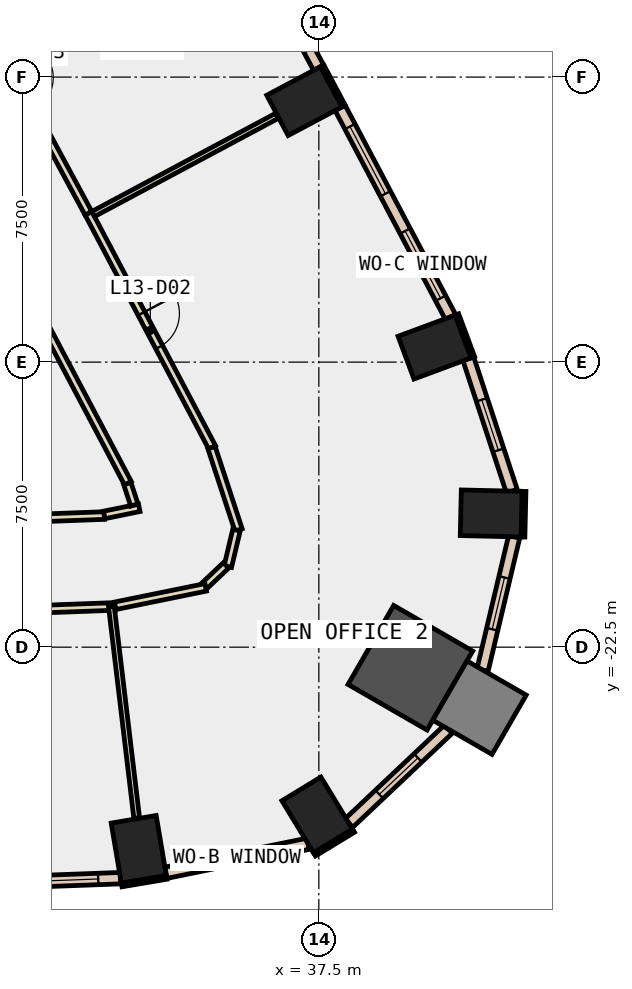
"""IFC4 building model, lengths in metres.
Left out: names, types, materials, properties, quantities, classifications, styles, units other than length and angle.
Written with IfcOpenShell. Run it as: python <this file> out.ifc"""

import sys

from ifc_helpers import new_model, si_unit, direction, frame, frame_2d, origin, origin_2d, place, context, subcontext, project, spatial, rectangle, extrude, element, fill, save


model = new_model("IFC4")
c1 = context("Model", 3, precision=1e-05, world=origin(), true_north=direction((0.0, 1.0)))
c2 = subcontext(c1, "Body", "Model", "MODEL_VIEW")
j1 = project(units=[si_unit("LENGTHUNIT", "METRE"), si_unit("PLANEANGLEUNIT", "RADIAN")], contexts=[c1])
p1 = place(None, origin())
s1 = spatial("IfcSite", under=j1, at=p1, CompositionType="ELEMENT")
p2 = place(p1, origin())
s2 = spatial("IfcBuilding", under=s1, at=p2, CompositionType="ELEMENT")
p3 = place(p2, frame((0.0, 0.0, 64.4)))
s3 = spatial("IfcBuildingStorey", under=s2, at=p3, CompositionType="ELEMENT", Elevation=64.4)
for number, where, z_axis, x_axis in (
    (1, (32.761, -27.818, -0.4), (0.0, 0.0, 1.0), (0.986, 0.167, 0.0)),
    (2, (37.457, -26.913, -0.4), (0.0, 0.0, 1.0), (0.855, 0.519, 0.0)),
):
    element("IfcColumn", number, at=place(p3, frame(where, z_axis=z_axis, x_axis=x_axis)), inside=s3, PredefinedType="COLUMN", context=c2, shape_type="SweptSolid", body=[
        extrude(rectangle(XDim=1.2, YDim=1.6, at=origin_2d()), origin(), (0.0, 0.0, 1.0), 4.2),
    ])
p4 = place(p3, frame((39.908, -23.041, -0.4), z_axis=(0.0, 0.0, 1.0), x_axis=(-0.866025403784, 0.5, 0.0)))
e3 = element("IfcColumn", 3, at=p4, inside=s3, PredefinedType="COLUMN", context=c2, shape_type="SweptSolid", body=[
    extrude(rectangle(XDim=2.4, YDim=2.4, at=origin_2d()), origin(), (0.0, 0.0, 1.0), 4.2),
])
for number, where, z_axis, x_axis in (
    (4, (42.035, -18.982, -0.4), (0.0, 0.0, 1.0), (0.023, 1.0, 0.0)),
    (5, (40.544, -14.604, -0.4), (0.0, 0.0, 1.0), (-0.348, 0.937, 0.0)),
    (6, (37.117, -8.132, -0.4), (0.0, 0.0, 1.0), (-0.469, 0.883, 0.0)),
):
    element("IfcColumn", number, at=place(p3, frame(where, z_axis=z_axis, x_axis=x_axis)), inside=s3, PredefinedType="COLUMN", context=c2, shape_type="SweptSolid", body=[
        extrude(rectangle(XDim=1.2, YDim=1.6, at=origin_2d()), origin(), (0.0, 0.0, 1.0), 4.2),
    ])
p5 = place(p3, frame((41.727, -24.091, -0.4), z_axis=(0.0, 0.0, 1.0), x_axis=(-0.866025403784, 0.5, 0.0)))
e7 = element("IfcColumn", 7, at=p5, inside=s3, PredefinedType="COLUMN", context=c2, shape_type="SweptSolid", body=[
    extrude(rectangle(XDim=1.8, YDim=1.8, at=origin_2d()), origin(), (0.0, 0.0, 1.0), 4.2),
])
p6 = place(p3, frame((41.55, -14.871, 0.0), z_axis=(0.0, 0.0, 1.0), x_axis=(-0.348268249601, 0.937394914814, 0.0)))
e8 = element("IfcWall", 8, at=p6, inside=s3, PredefinedType="STANDARD", context=c2, shape_type="SweptSolid", body=[
    extrude(rectangle(XDim=1.2, YDim=0.1, at=frame_2d((0.6, 0.0))), origin(), (0.0, 0.0, 1.0), 3.8),
])
p7 = place(p3, frame((38.149, -8.263, 0.0), z_axis=(0.0, 0.0, 1.0), x_axis=(-0.469467784567, 0.882949601763, 0.0)))
e9 = element("IfcWall", 9, at=p7, inside=s3, PredefinedType="STANDARD", context=c2, shape_type="SweptSolid", body=[
    extrude(rectangle(XDim=1.199, YDim=0.1, at=frame_2d((0.6, 0.0))), origin(), (0.0, 0.0, 1.0), 3.8),
])
p8 = place(p3, frame((32.311, -28.756, 0.0), z_axis=(0.0, 0.0, 1.0), x_axis=(0.98597830993, 0.166873522011, 0.0)))
e10 = element("IfcWall", 10, at=p8, inside=s3, PredefinedType="STANDARD", context=c2, shape_type="SweptSolid", body=[
    extrude(rectangle(XDim=1.2, YDim=0.1, at=frame_2d((0.6, 0.0))), origin(), (0.0, 0.0, 1.0), 3.8),
])
p9 = place(p3, frame((37.385, -27.951, 0.0), z_axis=(0.0, 0.0, 1.0), x_axis=(0.854716608594, 0.519094903649, 0.0)))
e11 = element("IfcWall", 11, at=p9, inside=s3, PredefinedType="STANDARD", context=c2, shape_type="SweptSolid", body=[
    extrude(rectangle(XDim=1.2, YDim=0.1, at=frame_2d((0.6, 0.0))), origin(), (0.0, 0.0, 1.0), 3.8),
])
p10 = place(p3, frame((42.871, -19.601, 0.0), z_axis=(0.0, 0.0, 1.0), x_axis=(0.023183352363, 0.999731229968, 0.0)))
e12 = element("IfcWall", 12, at=p10, inside=s3, PredefinedType="STANDARD", context=c2, shape_type="SweptSolid", body=[
    extrude(rectangle(XDim=1.2, YDim=0.1, at=frame_2d((0.6, 0.0))), origin(), (0.0, 0.0, 1.0), 3.8),
])
p11 = place(p3, frame((25.134, -28.841, 0.0), z_axis=(0.0, 0.0, 1.0), x_axis=(0.999322852286, 0.036794522671, 0.0)))
e13 = element("IfcWall", 13, at=p11, inside=s3, PredefinedType="STANDARD", context=c2, shape_type="SweptSolid", body=[
    extrude(rectangle(XDim=7.153, YDim=0.3, at=frame_2d((3.576, 0.0))), origin(), (0.0, 0.0, 1.0), 3.8),
])
p12 = place(p11, frame((0.588, 0.0, 0.9)))
e14 = element("IfcOpeningElement", 14, at=p12, cuts=e13, PredefinedType="OPENING", context=c2, shape_type="SweptSolid", body=[
    extrude(rectangle(XDim=2.4, YDim=2.6, at=frame_2d((1.2, 1.3))), frame((0.0, 0.16, 0.0), z_axis=(0.0, -1.0, 0.0), x_axis=(1.0, 0.0, 0.0)), (0.0, 0.0, 1.0), 0.32),
])
p13 = place(p11, frame((4.165, 0.0, 0.9)))
e15 = element("IfcOpeningElement", 15, at=p13, cuts=e13, PredefinedType="OPENING", context=c2, shape_type="SweptSolid", body=[
    extrude(rectangle(XDim=2.4, YDim=2.6, at=frame_2d((1.2, 1.3))), frame((0.0, 0.16, 0.0), z_axis=(0.0, -1.0, 0.0), x_axis=(1.0, 0.0, 0.0)), (0.0, 0.0, 1.0), 0.32),
])
p14 = place(p3, frame((33.473, -28.437, 0.0), z_axis=(0.0, 0.0, 1.0), x_axis=(0.979824229846, 0.199861148317, 0.0)))
e16 = element("IfcWall", 16, at=p14, inside=s3, PredefinedType="STANDARD", context=c2, shape_type="SweptSolid", body=[
    extrude(rectangle(XDim=3.822, YDim=0.3, at=frame_2d((1.911, 0.0))), origin(), (0.0, 0.0, 1.0), 3.8),
])
p15 = place(p14, frame((1.211, 0.0, 0.9)))
e17 = element("IfcOpeningElement", 17, at=p15, cuts=e16, PredefinedType="OPENING", context=c2, shape_type="SweptSolid", body=[
    extrude(rectangle(XDim=1.4, YDim=2.6, at=frame_2d((0.7, 1.3))), frame((0.0, 0.16, 0.0), z_axis=(0.0, -1.0, 0.0), x_axis=(1.0, 0.0, 0.0)), (0.0, 0.0, 1.0), 0.32),
])
p16 = place(p3, frame((38.29, -27.13, 0.0), z_axis=(0.0, 0.0, 1.0), x_axis=(0.727082698591, 0.686549888508, 0.0)))
e18 = element("IfcWall", 18, at=p16, inside=s3, PredefinedType="STANDARD", context=c2, shape_type="SweptSolid", body=[
    extrude(rectangle(XDim=3.602, YDim=0.3, at=frame_2d((1.801, 0.0))), origin(), (0.0, 0.0, 1.0), 3.8),
])
p17 = place(p16, frame((1.101, 0.0, 0.9)))
e19 = element("IfcOpeningElement", 19, at=p17, cuts=e18, PredefinedType="OPENING", context=c2, shape_type="SweptSolid", body=[
    extrude(rectangle(XDim=1.4, YDim=2.6, at=frame_2d((0.7, 1.3))), frame((0.0, 0.16, 0.0), z_axis=(0.0, -1.0, 0.0), x_axis=(1.0, 0.0, 0.0)), (0.0, 0.0, 1.0), 0.32),
])
p18 = place(p3, frame((41.808, -23.1, 0.0), z_axis=(0.0, 0.0, 1.0), x_axis=(0.230893603767, 0.972979004778, 0.0)))
e20 = element("IfcWall", 20, at=p18, inside=s3, PredefinedType="STANDARD", context=c2, shape_type="SweptSolid", body=[
    extrude(rectangle(XDim=3.603, YDim=0.3, at=frame_2d((1.801, 0.0))), origin(), (0.0, 0.0, 1.0), 3.8),
])
p19 = place(p18, frame((1.101, 0.0, 0.9)))
e21 = element("IfcOpeningElement", 21, at=p19, cuts=e20, PredefinedType="OPENING", context=c2, shape_type="SweptSolid", body=[
    extrude(rectangle(XDim=1.4, YDim=2.6, at=frame_2d((0.7, 1.3))), frame((0.0, 0.16, 0.0), z_axis=(0.0, -1.0, 0.0), x_axis=(1.0, 0.0, 0.0)), (0.0, 0.0, 1.0), 0.32),
])
p20 = place(p3, frame((42.578, -18.395, 0.0), z_axis=(0.0, 0.0, 1.0), x_axis=(-0.31208801137, 0.95005319491, 0.0)))
e22 = element("IfcWall", 22, at=p20, inside=s3, PredefinedType="STANDARD", context=c2, shape_type="SweptSolid", body=[
    extrude(rectangle(XDim=3.665, YDim=0.3, at=frame_2d((1.833, 0.0))), origin(), (0.0, 0.0, 1.0), 3.8),
])
p21 = place(p20, frame((1.133, 0.0, 0.9)))
e23 = element("IfcOpeningElement", 23, at=p21, cuts=e22, PredefinedType="OPENING", context=c2, shape_type="SweptSolid", body=[
    extrude(rectangle(XDim=1.4, YDim=2.6, at=frame_2d((0.7, 1.3))), frame((0.0, 0.16, 0.0), z_axis=(0.0, -1.0, 0.0), x_axis=(1.0, 0.0, 0.0)), (0.0, 0.0, 1.0), 0.32),
])
p22 = place(p3, frame((40.964, -13.81, 0.0), z_axis=(0.0, 0.0, 1.0), x_axis=(-0.467041710902, 0.884235285587, 0.0)))
e24 = element("IfcWall", 24, at=p22, inside=s3, PredefinedType="STANDARD", context=c2, shape_type="SweptSolid", body=[
    extrude(rectangle(XDim=6.22, YDim=0.3, at=frame_2d((3.11, 0.0))), origin(), (0.0, 0.0, 1.0), 3.8),
])
p23 = place(p22, frame((0.555, 0.0, 0.9)))
e25 = element("IfcOpeningElement", 25, at=p23, cuts=e24, PredefinedType="OPENING", context=c2, shape_type="SweptSolid", body=[
    extrude(rectangle(XDim=2.0, YDim=2.6, at=frame_2d((1.0, 1.3))), frame((0.0, 0.16, 0.0), z_axis=(0.0, -1.0, 0.0), x_axis=(1.0, 0.0, 0.0)), (0.0, 0.0, 1.0), 0.32),
])
p24 = place(p22, frame((3.665, 0.0, 0.9)))
e26 = element("IfcOpeningElement", 26, at=p24, cuts=e24, PredefinedType="OPENING", context=c2, shape_type="SweptSolid", body=[
    extrude(rectangle(XDim=2.0, YDim=2.6, at=frame_2d((1.0, 1.3))), frame((0.0, 0.16, 0.0), z_axis=(0.0, -1.0, 0.0), x_axis=(1.0, 0.0, 0.0)), (0.0, 0.0, 1.0), 0.32),
])
p25 = place(p3, frame((37.495, -7.253, 0.0), z_axis=(0.0, 0.0, 1.0), x_axis=(-0.475413659872, 0.879762383833, 0.0)))
e27 = element("IfcWall", 27, at=p25, inside=s3, PredefinedType="STANDARD", context=c2, shape_type="SweptSolid", body=[
    extrude(rectangle(XDim=6.125, YDim=0.3, at=frame_2d((3.063, 0.0))), origin(), (0.0, 0.0, 1.0), 3.8),
])
p26 = place(p25, frame((0.531, 0.0, 0.9)))
e28 = element("IfcOpeningElement", 28, at=p26, cuts=e27, PredefinedType="OPENING", context=c2, shape_type="SweptSolid", body=[
    extrude(rectangle(XDim=2.0, YDim=2.6, at=frame_2d((1.0, 1.3))), frame((0.0, 0.16, 0.0), z_axis=(0.0, -1.0, 0.0), x_axis=(1.0, 0.0, 0.0)), (0.0, 0.0, 1.0), 0.32),
])
p27 = place(p25, frame((3.594, 0.0, 0.9)))
e29 = element("IfcOpeningElement", 29, at=p27, cuts=e27, PredefinedType="OPENING", context=c2, shape_type="SweptSolid", body=[
    extrude(rectangle(XDim=2.0, YDim=2.6, at=frame_2d((1.0, 1.3))), frame((0.0, 0.16, 0.0), z_axis=(0.0, -1.0, 0.0), x_axis=(1.0, 0.0, 0.0)), (0.0, 0.0, 1.0), 0.32),
])
p28 = place(p3, frame((24.235, -19.318, 0.0), z_axis=(0.0, 0.0, 1.0), x_axis=(0.999320698485, 0.036852972476, 0.0)))
e30 = element("IfcWall", 30, at=p28, inside=s3, PredefinedType="PARTITIONING", context=c2, shape_type="SweptSolid", body=[
    extrude(rectangle(XDim=7.625, YDim=0.2, at=frame_2d((3.812, 0.0))), origin(), (0.0, 0.0, 1.0), 3.8),
])
p29 = place(p3, frame((31.853, -19.021, 0.0), z_axis=(0.0, 0.0, 1.0), x_axis=(0.979793671436, 0.200010903236, 0.0)))
e31 = element("IfcWall", 31, at=p29, inside=s3, PredefinedType="PARTITIONING", context=c2, shape_type="SweptSolid", body=[
    extrude(rectangle(XDim=0.94, YDim=0.2, at=frame_2d((0.47, 0.0))), origin(), (0.0, 0.0, 1.0), 3.8),
])
p30 = place(p3, frame((32.645, -18.758, 0.0), z_axis=(0.0, 0.0, 1.0), x_axis=(-0.311683867653, 0.950185859001, 0.0)))
e32 = element("IfcWall", 32, at=p30, inside=s3, PredefinedType="PARTITIONING", context=c2, shape_type="SweptSolid", body=[
    extrude(rectangle(XDim=0.597, YDim=0.2, at=frame_2d((0.298, 0.0))), origin(), (0.0, 0.0, 1.0), 3.8),
])
p31 = place(p3, frame((32.475, -18.185, 0.0), z_axis=(0.0, 0.0, 1.0), x_axis=(-0.467123190417, 0.884192244353, 0.0)))
e33 = element("IfcWall", 33, at=p31, inside=s3, PredefinedType="PARTITIONING", context=c2, shape_type="SweptSolid", body=[
    extrude(rectangle(XDim=6.677, YDim=0.2, at=frame_2d((3.339, 0.0))), origin(), (0.0, 0.0, 1.0), 3.8),
])
p32 = place(p3, frame((32.141, -21.428, 0.0), z_axis=(0.0, 0.0, 1.0), x_axis=(-0.999324021202, -0.036762761723, 0.0)))
e34 = element("IfcWall", 34, at=p32, inside=s3, PredefinedType="PARTITIONING", context=c2, shape_type="SweptSolid", body=[
    extrude(rectangle(XDim=7.836, YDim=0.2, at=frame_2d((3.918, 0.0))), origin(), (0.0, 0.0, 1.0), 3.8),
])
p33 = place(p3, frame((31.438, -11.083, 0.0), z_axis=(0.0, 0.0, 1.0), x_axis=(0.467077609314, -0.884216323575, 0.0)))
e35 = element("IfcWall", 35, at=p33, inside=s3, PredefinedType="PARTITIONING", context=c2, shape_type="SweptSolid", body=[
    extrude(rectangle(XDim=6.967, YDim=0.2, at=frame_2d((3.483, 0.0))), origin(), (0.0, 0.0, 1.0), 3.8),
])
p34 = place(p33, frame((2.983, 0.0, 0.0)))
e36 = element("IfcOpeningElement", 36, at=p34, cuts=e35, PredefinedType="OPENING", context=c2, shape_type="SweptSolid", body=[
    extrude(rectangle(XDim=1.0, YDim=2.1, at=frame_2d((0.5, 1.05))), frame((0.0, 0.11, 0.0), z_axis=(0.0, -1.0, 0.0), x_axis=(1.0, 0.0, 0.0)), (0.0, 0.0, 1.0), 0.22),
])
p35 = place(p3, frame((34.676, -17.25, 0.0), z_axis=(0.0, 0.0, 1.0), x_axis=(0.311855014756, -0.950129701552, 0.0)))
e37 = element("IfcWall", 37, at=p35, inside=s3, PredefinedType="PARTITIONING", context=c2, shape_type="SweptSolid", body=[
    extrude(rectangle(XDim=2.28, YDim=0.2, at=frame_2d((1.14, 0.0))), origin(), (0.0, 0.0, 1.0), 3.8),
])
p36 = place(p3, frame((35.333, -19.419, 0.0), z_axis=(0.0, 0.0, 1.0), x_axis=(-0.231107564644, -0.97292820576, 0.0)))
e38 = element("IfcWall", 38, at=p36, inside=s3, PredefinedType="PARTITIONING", context=c2, shape_type="SweptSolid", body=[
    extrude(rectangle(XDim=0.987, YDim=0.2, at=frame_2d((0.493, 0.0))), origin(), (0.0, 0.0, 1.0), 3.8),
])
p37 = place(p3, frame((35.056, -20.35, 0.0), z_axis=(0.0, 0.0, 1.0), x_axis=(-0.72702197617, -0.686614190186, 0.0)))
e39 = element("IfcWall", 39, at=p37, inside=s3, PredefinedType="PARTITIONING", context=c2, shape_type="SweptSolid", body=[
    extrude(rectangle(XDim=0.767, YDim=0.2, at=frame_2d((0.384, 0.0))), origin(), (0.0, 0.0, 1.0), 3.8),
])
p38 = place(p3, frame((34.523, -20.926, 0.0), z_axis=(0.0, 0.0, 1.0), x_axis=(-0.979840552367, -0.199781110063, 0.0)))
e40 = element("IfcWall", 40, at=p38, inside=s3, PredefinedType="PARTITIONING", context=c2, shape_type="SweptSolid", body=[
    extrude(rectangle(XDim=2.433, YDim=0.2, at=frame_2d((1.217, 0.0))), origin(), (0.0, 0.0, 1.0), 3.8),
])
p39 = place(p3, frame((27.988, -4.699, 0.0), z_axis=(0.0, 0.0, 1.0), x_axis=(0.475319272717, -0.879813383044, 0.0)))
e41 = element("IfcWall", 41, at=p39, inside=s3, PredefinedType="PARTITIONING", context=c2, shape_type="SweptSolid", body=[
    extrude(rectangle(XDim=7.256, YDim=0.2, at=frame_2d((3.628, 0.0))), origin(), (0.0, 0.0, 1.0), 3.8),
])
p40 = place(p39, frame((3.203, 0.0, 0.0)))
e42 = element("IfcOpeningElement", 42, at=p40, cuts=e41, PredefinedType="OPENING", context=c2, shape_type="SweptSolid", body=[
    extrude(rectangle(XDim=1.0, YDim=2.1, at=frame_2d((0.5, 1.05))), frame((0.0, 0.11, 0.0), z_axis=(0.0, -1.0, 0.0), x_axis=(1.0, 0.0, 0.0)), (0.0, 0.0, 1.0), 0.22),
])
p41 = place(p3, frame((32.041, -21.432, 0.0), z_axis=(0.0, 0.0, 1.0), x_axis=(0.118848018273, -0.992912457648, 0.0)))
e43 = element("IfcWall", 43, at=p41, inside=s3, PredefinedType="PARTITIONING", context=c2, shape_type="SweptSolid", body=[
    extrude(rectangle(XDim=5.604, YDim=0.15, at=frame_2d((2.802, 0.0))), origin(), (0.0, 0.0, 1.0), 3.8),
])
p42 = place(p3, frame((31.561, -11.103, 0.0), z_axis=(0.0, 0.0, 1.0), x_axis=(0.882056805494, 0.47114306944, 0.0)))
e44 = element("IfcWall", 44, at=p42, inside=s3, PredefinedType="PARTITIONING", context=c2, shape_type="SweptSolid", body=[
    extrude(rectangle(XDim=5.48, YDim=0.15, at=frame_2d((2.74, 0.0))), origin(), (0.0, 0.0, 1.0), 3.8),
])
p43 = place(p13, origin())
e45 = element("IfcWindow", 45, at=p43, inside=s3, PartitioningType="SINGLE_PANEL", PredefinedType="WINDOW", context=c2, shape_type="SweptSolid", body=[
    extrude(rectangle(XDim=2.4, YDim=2.6, at=frame_2d((1.2, 1.3))), frame((0.0, 0.03, 0.0), z_axis=(0.0, -1.0, 0.0), x_axis=(1.0, 0.0, 0.0)), (0.0, 0.0, 1.0), 0.06),
])
fill(e15, e45)
p44 = place(p15, origin())
e46 = element("IfcWindow", 46, at=p44, inside=s3, PartitioningType="SINGLE_PANEL", PredefinedType="WINDOW", context=c2, shape_type="SweptSolid", body=[
    extrude(rectangle(XDim=1.4, YDim=2.6, at=frame_2d((0.7, 1.3))), frame((0.0, 0.03, 0.0), z_axis=(0.0, -1.0, 0.0), x_axis=(1.0, 0.0, 0.0)), (0.0, 0.0, 1.0), 0.06),
])
fill(e17, e46)
p45 = place(p17, origin())
e47 = element("IfcWindow", 47, at=p45, inside=s3, PartitioningType="SINGLE_PANEL", PredefinedType="WINDOW", context=c2, shape_type="SweptSolid", body=[
    extrude(rectangle(XDim=1.4, YDim=2.6, at=frame_2d((0.7, 1.3))), frame((0.0, 0.03, 0.0), z_axis=(0.0, -1.0, 0.0), x_axis=(1.0, 0.0, 0.0)), (0.0, 0.0, 1.0), 0.06),
])
fill(e19, e47)
p46 = place(p19, origin())
e48 = element("IfcWindow", 48, at=p46, inside=s3, PartitioningType="SINGLE_PANEL", PredefinedType="WINDOW", context=c2, shape_type="SweptSolid", body=[
    extrude(rectangle(XDim=1.4, YDim=2.6, at=frame_2d((0.7, 1.3))), frame((0.0, 0.03, 0.0), z_axis=(0.0, -1.0, 0.0), x_axis=(1.0, 0.0, 0.0)), (0.0, 0.0, 1.0), 0.06),
])
fill(e21, e48)
p47 = place(p21, origin())
e49 = element("IfcWindow", 49, at=p47, inside=s3, PartitioningType="SINGLE_PANEL", PredefinedType="WINDOW", context=c2, shape_type="SweptSolid", body=[
    extrude(rectangle(XDim=1.4, YDim=2.6, at=frame_2d((0.7, 1.3))), frame((0.0, 0.03, 0.0), z_axis=(0.0, -1.0, 0.0), x_axis=(1.0, 0.0, 0.0)), (0.0, 0.0, 1.0), 0.06),
])
fill(e23, e49)
p48 = place(p23, origin())
e50 = element("IfcWindow", 50, at=p48, inside=s3, PartitioningType="SINGLE_PANEL", PredefinedType="WINDOW", context=c2, shape_type="SweptSolid", body=[
    extrude(rectangle(XDim=2.0, YDim=2.6, at=frame_2d((1.0, 1.3))), frame((0.0, 0.03, 0.0), z_axis=(0.0, -1.0, 0.0), x_axis=(1.0, 0.0, 0.0)), (0.0, 0.0, 1.0), 0.06),
])
fill(e25, e50)
p49 = place(p24, origin())
e51 = element("IfcWindow", 51, at=p49, inside=s3, PartitioningType="SINGLE_PANEL", PredefinedType="WINDOW", context=c2, shape_type="SweptSolid", body=[
    extrude(rectangle(XDim=2.0, YDim=2.6, at=frame_2d((1.0, 1.3))), frame((0.0, 0.03, 0.0), z_axis=(0.0, -1.0, 0.0), x_axis=(1.0, 0.0, 0.0)), (0.0, 0.0, 1.0), 0.06),
])
fill(e26, e51)
p50 = place(p34, origin())
e52 = element("IfcDoor", 52, at=p50, inside=s3, OperationType="SINGLE_SWING_LEFT", PredefinedType="DOOR", context=c2, shape_type="SweptSolid", body=[
    extrude(rectangle(XDim=1.0, YDim=2.1, at=frame_2d((0.5, 1.05))), frame((0.0, 0.025, 0.0), z_axis=(0.0, -1.0, 0.0), x_axis=(1.0, 0.0, 0.0)), (0.0, 0.0, 1.0), 0.05),
])
fill(e36, e52)
save(model, sys.argv[1])
